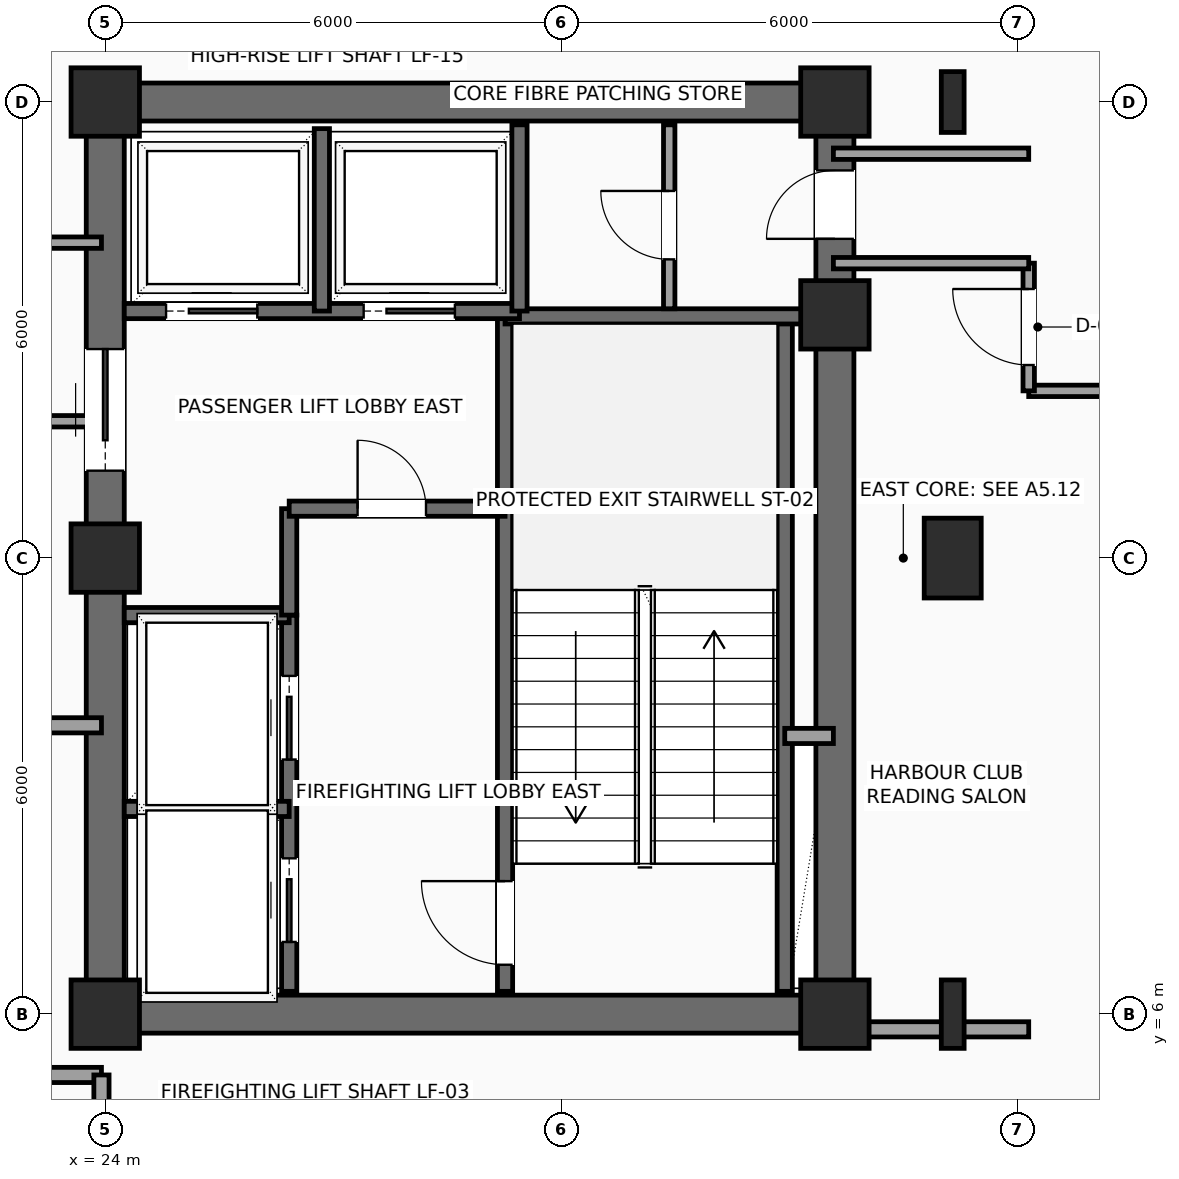
"""IFC4 building model, lengths in metres.
Left out: names, types, materials, properties, quantities, classifications, styles, units other than length and angle.
Written with IfcOpenShell. Run it as: python <this file> out.ifc"""

import sys

from ifc_helpers import new_model, si_unit, direction, frame, frame_2d, origin, origin_2d, place, context, subcontext, project, spatial, rectangle, i_section, extrude, element, fill, save


model = new_model("IFC4")
c1 = context("Model", 3, precision=1e-05, world=origin(), true_north=direction((0.0, 1.0)))
c2 = subcontext(c1, "Body", "Model", "MODEL_VIEW")
j1 = project(units=[si_unit("LENGTHUNIT", "METRE"), si_unit("PLANEANGLEUNIT", "RADIAN")], contexts=[c1])
p1 = place(None, origin())
s1 = spatial("IfcSite", under=j1, at=p1, CompositionType="ELEMENT")
p2 = place(p1, origin())
s2 = spatial("IfcBuilding", under=s1, at=p2, CompositionType="ELEMENT")
p3 = place(p2, frame((0.0, 0.0, 231.15)))
s3 = spatial("IfcBuildingStorey", under=s2, at=p3, CompositionType="ELEMENT", Elevation=231.15)
for number, where, z_axis, x_axis in (
    (1, (24.0, 6.0, 0.0), (0.0, 0.0, 1.0), (1.0, 0.0, 0.0)),
    (2, (24.0, 12.0, 0.0), (0.0, 0.0, 1.0), (1.0, 0.0, 0.0)),
    (3, (24.0, 18.0, 0.0), (0.0, 0.0, 1.0), (1.0, 0.0, 0.0)),
    (4, (33.6, 6.0, 0.0), (0.0, 0.0, 1.0), (1.0, 0.0, 0.0)),
    (5, (33.6, 15.2, 0.0), (0.0, 0.0, 1.0), (1.0, 0.0, 0.0)),
    (6, (33.6, 18.0, 0.0), (0.0, 0.0, 1.0), (1.0, 0.0, 0.0)),
):
    element("IfcColumn", number, at=place(p3, frame(where, z_axis=z_axis, x_axis=x_axis)), inside=s3, PredefinedType="COLUMN", context=c2, shape_type="SweptSolid", body=[
        extrude(rectangle(XDim=0.9, YDim=0.9, at=origin_2d()), origin(), (0.0, 0.0, 1.0), 3.75),
    ])
p4 = place(p3, frame((35.15, 6.0, 0.0), z_axis=(0.0, 0.0, 1.0), x_axis=(1.0, 0.0, 0.0)))
e7 = element("IfcColumn", 7, at=p4, inside=s3, PredefinedType="COLUMN", context=c2, shape_type="SweptSolid", body=[
    extrude(i_section(OverallWidth=0.3, OverallDepth=0.9, WebThickness=0.019, FlangeThickness=0.035, FilletRadius=0.03, at=origin_2d()), origin(), (0.0, 0.0, 1.0), 3.75),
])
p5 = place(p3, frame((35.15, 12.0, 0.0), z_axis=(0.0, 0.0, 1.0), x_axis=(1.0, 0.0, 0.0)))
e8 = element("IfcColumn", 8, at=p5, inside=s3, PredefinedType="COLUMN", context=c2, shape_type="SweptSolid", body=[
    extrude(rectangle(XDim=0.75, YDim=1.05, at=origin_2d()), origin(), (0.0, 0.0, 1.0), 3.75),
])
p6 = place(p3, frame((35.15, 18.0, 0.0), z_axis=(0.0, 0.0, 1.0), x_axis=(1.0, 0.0, 0.0)))
e9 = element("IfcColumn", 9, at=p6, inside=s3, PredefinedType="COLUMN", context=c2, shape_type="SweptSolid", body=[
    extrude(i_section(OverallWidth=0.3, OverallDepth=0.8, WebThickness=0.018, FlangeThickness=0.033, FilletRadius=0.03, at=origin_2d()), origin(), (0.0, 0.0, 1.0), 3.75),
])
for number, where, z_axis, x_axis in (
    (10, (24.0, 6.0, 0.0), (0.0, 0.0, 1.0), (1.0, 0.0, 0.0)),
    (11, (24.0, 18.0, 0.0), (0.0, 0.0, 1.0), (1.0, 0.0, 0.0)),
):
    element("IfcWall", number, at=place(p3, frame(where, z_axis=z_axis, x_axis=x_axis)), inside=s3, PredefinedType="SHEAR", context=c2, shape_type="SweptSolid", body=[
        extrude(rectangle(XDim=9.6, YDim=0.5, at=frame_2d((4.8, 0.0))), origin(), (0.0, 0.0, 1.0), 3.425),
    ])
p7 = place(p3, frame((24.0, 6.0, 0.0), z_axis=(0.0, 0.0, 1.0), x_axis=(0.0, 1.0, 0.0)))
e12 = element("IfcWall", 12, at=p7, inside=s3, PredefinedType="SHEAR", context=c2, shape_type="SweptSolid", body=[
    extrude(rectangle(XDim=12.0, YDim=0.5, at=frame_2d((6.0, 0.0))), origin(), (0.0, 0.0, 1.0), 3.425),
])
p8 = place(p7, frame((7.15, 0.0, 0.0)))
e13 = element("IfcOpeningElement", 13, at=p8, cuts=e12, PredefinedType="OPENING", context=c2, shape_type="SweptSolid", body=[
    extrude(rectangle(XDim=1.6, YDim=2.3, at=frame_2d((0.8, 1.15))), frame((0.0, 0.26, 0.0), z_axis=(0.0, -1.0, 0.0), x_axis=(1.0, 0.0, 0.0)), (0.0, 0.0, 1.0), 0.52),
])
p9 = place(p3, frame((33.6, 6.0, 0.0), z_axis=(0.0, 0.0, 1.0), x_axis=(0.0, 1.0, 0.0)))
e14 = element("IfcWall", 14, at=p9, inside=s3, PredefinedType="SHEAR", context=c2, shape_type="SweptSolid", body=[
    extrude(rectangle(XDim=12.0, YDim=0.5, at=frame_2d((6.0, 0.0))), origin(), (0.0, 0.0, 1.0), 3.425),
])
p10 = place(p9, frame((10.2, 0.0, 0.0)))
e15 = element("IfcOpeningElement", 15, at=p10, cuts=e14, PredefinedType="OPENING", context=c2, shape_type="SweptSolid", body=[
    extrude(rectangle(XDim=0.9, YDim=2.15, at=frame_2d((0.45, 1.075))), frame((0.0, 0.26, 0.0), z_axis=(0.0, -1.0, 0.0), x_axis=(1.0, 0.0, 0.0)), (0.0, 0.0, 1.0), 0.52),
])
p11 = place(p3, frame((29.26, 6.3, 0.0), z_axis=(0.0, 0.0, 1.0), x_axis=(0.0, 1.0, 0.0)))
e16 = element("IfcWall", 16, at=p11, inside=s3, PredefinedType="SHEAR", context=c2, shape_type="SweptSolid", body=[
    extrude(rectangle(XDim=8.88, YDim=0.2, at=frame_2d((4.44, 0.0))), origin(), (0.0, 0.0, 1.0), 3.425),
])
p12 = place(p11, frame((0.35, 0.0, 0.0)))
e17 = element("IfcOpeningElement", 17, at=p12, cuts=e16, PredefinedType="OPENING", context=c2, shape_type="SweptSolid", body=[
    extrude(rectangle(XDim=1.1, YDim=2.2, at=frame_2d((0.55, 1.1))), frame((0.0, 0.11, 0.0), z_axis=(0.0, -1.0, 0.0), x_axis=(1.0, 0.0, 0.0)), (0.0, 0.0, 1.0), 0.22),
])
p13 = place(p3, frame((32.94, 6.3, 0.0), z_axis=(0.0, 0.0, 1.0), x_axis=(0.0, 1.0, 0.0)))
e18 = element("IfcWall", 18, at=p13, inside=s3, PredefinedType="SHEAR", context=c2, shape_type="SweptSolid", body=[
    extrude(rectangle(XDim=8.88, YDim=0.2, at=frame_2d((4.44, 0.0))), origin(), (0.0, 0.0, 1.0), 3.425),
])
p14 = place(p3, frame((29.26, 15.18, 0.0), z_axis=(0.0, 0.0, 1.0), x_axis=(1.0, 0.0, 0.0)))
e19 = element("IfcWall", 19, at=p14, inside=s3, PredefinedType="SHEAR", context=c2, shape_type="SweptSolid", body=[
    extrude(rectangle(XDim=4.04, YDim=0.2, at=frame_2d((2.02, 0.0))), origin(), (0.0, 0.0, 1.0), 3.425),
])
p15 = place(p3, frame((26.42, 6.3, 0.0), z_axis=(0.0, 0.0, 1.0), x_axis=(0.0, 1.0, 0.0)))
e20 = element("IfcWall", 20, at=p15, inside=s3, PredefinedType="SHEAR", context=c2, shape_type="SweptSolid", body=[
    extrude(rectangle(XDim=4.95, YDim=0.2, at=frame_2d((2.475, 0.0))), origin(), (0.0, 0.0, 1.0), 3.425),
])
p16 = place(p15, frame((0.65, 0.0, 0.0)))
e21 = element("IfcOpeningElement", 21, at=p16, cuts=e20, PredefinedType="OPENING", context=c2, shape_type="SweptSolid", body=[
    extrude(rectangle(XDim=1.1, YDim=2.2, at=frame_2d((0.55, 1.1))), frame((0.0, 0.11, 0.0), z_axis=(0.0, -1.0, 0.0), x_axis=(1.0, 0.0, 0.0)), (0.0, 0.0, 1.0), 0.22),
])
p17 = place(p15, frame((3.05, 0.0, 0.0)))
e22 = element("IfcOpeningElement", 22, at=p17, cuts=e20, PredefinedType="OPENING", context=c2, shape_type="SweptSolid", body=[
    extrude(rectangle(XDim=1.1, YDim=2.2, at=frame_2d((0.55, 1.1))), frame((0.0, 0.11, 0.0), z_axis=(0.0, -1.0, 0.0), x_axis=(1.0, 0.0, 0.0)), (0.0, 0.0, 1.0), 0.22),
])
for number, where, z_axis, x_axis in (
    (23, (24.25, 8.7, 0.0), (0.0, 0.0, 1.0), (1.0, 0.0, 0.0)),
    (24, (24.25, 11.25, 0.0), (0.0, 0.0, 1.0), (1.0, 0.0, 0.0)),
):
    element("IfcWall", number, at=place(p3, frame(where, z_axis=z_axis, x_axis=x_axis)), inside=s3, PredefinedType="SHEAR", context=c2, shape_type="SweptSolid", body=[
        extrude(rectangle(XDim=2.17, YDim=0.2, at=frame_2d((1.085, 0.0))), origin(), (0.0, 0.0, 1.0), 3.425),
    ])
p18 = place(p3, frame((26.42, 11.25, 0.0), z_axis=(0.0, 0.0, 1.0), x_axis=(0.0, 1.0, 0.0)))
e25 = element("IfcWall", 25, at=p18, inside=s3, PredefinedType="SHEAR", context=c2, shape_type="SweptSolid", body=[
    extrude(rectangle(XDim=1.4, YDim=0.2, at=frame_2d((0.7, 0.0))), origin(), (0.0, 0.0, 1.0), 3.425),
])
p19 = place(p3, frame((26.42, 12.65, 0.0), z_axis=(0.0, 0.0, 1.0), x_axis=(1.0, 0.0, 0.0)))
e26 = element("IfcWall", 26, at=p19, inside=s3, PredefinedType="SHEAR", context=c2, shape_type="SweptSolid", body=[
    extrude(rectangle(XDim=2.84, YDim=0.2, at=frame_2d((1.42, 0.0))), origin(), (0.0, 0.0, 1.0), 3.425),
])
p20 = place(p19, frame((0.9, 0.0, 0.0)))
e27 = element("IfcOpeningElement", 27, at=p20, cuts=e26, PredefinedType="OPENING", context=c2, shape_type="SweptSolid", body=[
    extrude(rectangle(XDim=0.9, YDim=2.15, at=frame_2d((0.45, 1.075))), frame((0.0, 0.11, 0.0), z_axis=(0.0, -1.0, 0.0), x_axis=(1.0, 0.0, 0.0)), (0.0, 0.0, 1.0), 0.22),
])
p21 = place(p3, frame((32.94, 9.66, 0.0), z_axis=(0.0, 0.0, 1.0), x_axis=(1.0, 0.0, 0.0)))
e28 = element("IfcWall", 28, at=p21, inside=s3, PredefinedType="SOLIDWALL", context=c2, shape_type="SweptSolid", body=[
    extrude(rectangle(XDim=0.64, YDim=0.2, at=frame_2d((0.32, 0.0))), origin(), (0.0, 0.0, 1.0), 3.425),
])
p22 = place(p3, frame((24.25, 15.25, 0.0), z_axis=(0.0, 0.0, 1.0), x_axis=(1.0, 0.0, 0.0)))
e29 = element("IfcWall", 29, at=p22, inside=s3, PredefinedType="SHEAR", context=c2, shape_type="SweptSolid", body=[
    extrude(rectangle(XDim=5.2, YDim=0.2, at=frame_2d((2.6, 0.0))), origin(), (0.0, 0.0, 1.0), 3.425),
])
p23 = place(p22, frame((0.55, 0.0, 0.0)))
e30 = element("IfcOpeningElement", 30, at=p23, cuts=e29, PredefinedType="OPENING", context=c2, shape_type="SweptSolid", body=[
    extrude(rectangle(XDim=1.2, YDim=2.2, at=frame_2d((0.6, 1.1))), frame((0.0, 0.11, 0.0), z_axis=(0.0, -1.0, 0.0), x_axis=(1.0, 0.0, 0.0)), (0.0, 0.0, 1.0), 0.22),
])
p24 = place(p22, frame((3.15, 0.0, 0.0)))
e31 = element("IfcOpeningElement", 31, at=p24, cuts=e29, PredefinedType="OPENING", context=c2, shape_type="SweptSolid", body=[
    extrude(rectangle(XDim=1.2, YDim=2.2, at=frame_2d((0.6, 1.1))), frame((0.0, 0.11, 0.0), z_axis=(0.0, -1.0, 0.0), x_axis=(1.0, 0.0, 0.0)), (0.0, 0.0, 1.0), 0.22),
])
p25 = place(p3, frame((26.85, 15.25, 0.0), z_axis=(0.0, 0.0, 1.0), x_axis=(0.0, 1.0, 0.0)))
e32 = element("IfcWall", 32, at=p25, inside=s3, PredefinedType="SHEAR", context=c2, shape_type="SweptSolid", body=[
    extrude(rectangle(XDim=2.4, YDim=0.2, at=frame_2d((1.2, 0.0))), origin(), (0.0, 0.0, 1.0), 3.425),
])
p26 = place(p3, frame((29.45, 15.25, 0.0), z_axis=(0.0, 0.0, 1.0), x_axis=(0.0, 1.0, 0.0)))
e33 = element("IfcWall", 33, at=p26, inside=s3, PredefinedType="SHEAR", context=c2, shape_type="SweptSolid", body=[
    extrude(rectangle(XDim=2.45, YDim=0.2, at=frame_2d((1.225, 0.0))), origin(), (0.0, 0.0, 1.0), 3.425),
])
p27 = place(p3, frame((31.42, 15.28, 0.0), z_axis=(0.0, 0.0, 1.0), x_axis=(0.0, 1.0, 0.0)))
e34 = element("IfcWall", 34, at=p27, inside=s3, PredefinedType="PARTITIONING", context=c2, shape_type="SweptSolid", body=[
    extrude(rectangle(XDim=2.42, YDim=0.15, at=frame_2d((1.21, 0.0))), origin(), (0.0, 0.0, 1.0), 3.425),
])
p28 = place(p27, frame((0.65, 0.0, 0.0)))
e35 = element("IfcOpeningElement", 35, at=p28, cuts=e34, PredefinedType="OPENING", context=c2, shape_type="SweptSolid", body=[
    extrude(rectangle(XDim=0.9, YDim=2.15, at=frame_2d((0.45, 1.075))), frame((0.0, 0.085, 0.0), z_axis=(0.0, -1.0, 0.0), x_axis=(1.0, 0.0, 0.0)), (0.0, 0.0, 1.0), 0.17),
])
p29 = place(p3, frame((38.55, 14.2, 0.0), z_axis=(0.0, 0.0, 1.0), x_axis=(-1.0, 0.0, 0.0)))
e36 = element("IfcWall", 36, at=p29, inside=s3, PredefinedType="PARTITIONING", context=c2, shape_type="SweptSolid", body=[
    extrude(rectangle(XDim=2.4, YDim=0.15, at=frame_2d((1.2, 0.0))), origin(), (0.0, 0.0, 1.0), 3.425),
])
p30 = place(p3, frame((36.15, 14.2, 0.0), z_axis=(0.0, 0.0, 1.0), x_axis=(0.0, 1.0, 0.0)))
e37 = element("IfcWall", 37, at=p30, inside=s3, PredefinedType="PARTITIONING", context=c2, shape_type="SweptSolid", body=[
    extrude(rectangle(XDim=1.68, YDim=0.15, at=frame_2d((0.84, 0.0))), origin(), (0.0, 0.0, 1.0), 3.425),
])
p31 = place(p30, frame((0.34, 0.0, 0.0)))
e38 = element("IfcOpeningElement", 38, at=p31, cuts=e37, PredefinedType="OPENING", context=c2, shape_type="SweptSolid", body=[
    extrude(rectangle(XDim=1.0, YDim=2.2, at=frame_2d((0.5, 1.1))), frame((0.0, 0.085, 0.0), z_axis=(0.0, -1.0, 0.0), x_axis=(1.0, 0.0, 0.0)), (0.0, 0.0, 1.0), 0.17),
])
for number, where, z_axis, x_axis in (
    (39, (36.15, 15.88, 0.0), (0.0, 0.0, 1.0), (-1.0, 0.0, 0.0)),
    (40, (33.58, 17.32, 0.0), (0.0, 0.0, 1.0), (1.0, 0.0, 0.0)),
):
    element("IfcWall", number, at=place(p3, frame(where, z_axis=z_axis, x_axis=x_axis)), inside=s3, PredefinedType="PARTITIONING", context=c2, shape_type="SweptSolid", body=[
        extrude(rectangle(XDim=2.57, YDim=0.15, at=frame_2d((1.285, 0.0))), origin(), (0.0, 0.0, 1.0), 3.425),
    ])
p32 = place(p3, frame((20.45, 16.15, 0.0), z_axis=(0.0, 0.0, 1.0), x_axis=(1.0, 0.0, 0.0)))
e41 = element("IfcWall", 41, at=p32, inside=s3, PredefinedType="PARTITIONING", context=c2, shape_type="SweptSolid", body=[
    extrude(rectangle(XDim=3.5, YDim=0.15, at=frame_2d((1.75, 0.0))), origin(), (0.0, 0.0, 1.0), 3.425),
])
p33 = place(p3, frame((23.95, 13.8, 0.0), z_axis=(0.0, 0.0, 1.0), x_axis=(-1.0, 0.0, 0.0)))
e42 = element("IfcWall", 42, at=p33, inside=s3, PredefinedType="PARTITIONING", context=c2, shape_type="SweptSolid", body=[
    extrude(rectangle(XDim=9.0, YDim=0.15, at=frame_2d((4.5, 0.0))), origin(), (0.0, 0.0, 1.0), 3.425),
])
p34 = place(p3, frame((33.65, 5.8, 0.0), z_axis=(0.0, 0.0, 1.0), x_axis=(1.0, 0.0, 0.0)))
e43 = element("IfcWall", 43, at=p34, inside=s3, PredefinedType="PARTITIONING", context=c2, shape_type="SweptSolid", body=[
    extrude(rectangle(XDim=2.5, YDim=0.2, at=frame_2d((1.25, 0.0))), origin(), (0.0, 0.0, 1.0), 3.017),
])
p35 = place(p3, frame((14.95, 5.2, 0.0), z_axis=(0.0, 0.0, 1.0), x_axis=(1.0, 0.0, 0.0)))
e44 = element("IfcWall", 44, at=p35, inside=s3, PredefinedType="PARTITIONING", context=c2, shape_type="SweptSolid", body=[
    extrude(rectangle(XDim=9.0, YDim=0.2, at=frame_2d((4.5, 0.0))), origin(), (0.0, 0.0, 1.0), 3.425),
])
p36 = place(p3, frame((23.95, 0.3, 0.0), z_axis=(0.0, 0.0, 1.0), x_axis=(0.0, 1.0, 0.0)))
e45 = element("IfcWall", 45, at=p36, inside=s3, PredefinedType="PARTITIONING", context=c2, shape_type="SweptSolid", body=[
    extrude(rectangle(XDim=4.9, YDim=0.2, at=frame_2d((2.45, 0.0))), origin(), (0.0, 0.0, 1.0), 3.017),
])
p37 = place(p3, frame((14.95, 9.8, 0.0), z_axis=(0.0, 0.0, 1.0), x_axis=(1.0, 0.0, 0.0)))
e46 = element("IfcWall", 46, at=p37, inside=s3, PredefinedType="PARTITIONING", context=c2, shape_type="SweptSolid", body=[
    extrude(rectangle(XDim=9.0, YDim=0.2, at=frame_2d((4.5, 0.0))), origin(), (0.0, 0.0, 1.0), 3.425),
])
p38 = place(p8, origin())
e47 = element("IfcDoor", 47, at=p38, inside=s3, OperationType="DOUBLE_DOOR_SLIDING", PredefinedType="DOOR", context=c2, shape_type="SweptSolid", body=[
    extrude(rectangle(XDim=1.6, YDim=2.3, at=frame_2d((0.8, 1.15))), frame((0.0, 0.025, 0.0), z_axis=(0.0, -1.0, 0.0), x_axis=(1.0, 0.0, 0.0)), (0.0, 0.0, 1.0), 0.05),
])
fill(e13, e47)
p39 = place(p10, origin())
e48 = element("IfcDoor", 48, at=p39, inside=s3, OperationType="SINGLE_SWING_LEFT", PredefinedType="DOOR", context=c2, shape_type="SweptSolid", body=[
    extrude(rectangle(XDim=0.9, YDim=2.15, at=frame_2d((0.45, 1.075))), frame((0.0, 0.025, 0.0), z_axis=(0.0, -1.0, 0.0), x_axis=(1.0, 0.0, 0.0)), (0.0, 0.0, 1.0), 0.05),
])
fill(e15, e48)
p40 = place(p12, origin())
e49 = element("IfcDoor", 49, at=p40, inside=s3, OperationType="SINGLE_SWING_RIGHT", PredefinedType="DOOR", context=c2, shape_type="SweptSolid", body=[
    extrude(rectangle(XDim=1.1, YDim=2.2, at=frame_2d((0.55, 1.1))), frame((0.0, 0.025, 0.0), z_axis=(0.0, -1.0, 0.0), x_axis=(1.0, 0.0, 0.0)), (0.0, 0.0, 1.0), 0.05),
])
fill(e17, e49)
p41 = place(p16, origin())
e50 = element("IfcDoor", 50, at=p41, inside=s3, OperationType="SLIDING_TO_LEFT", PredefinedType="DOOR", context=c2, shape_type="SweptSolid", body=[
    extrude(rectangle(XDim=1.1, YDim=2.2, at=frame_2d((0.55, 1.1))), frame((0.0, 0.025, 0.0), z_axis=(0.0, -1.0, 0.0), x_axis=(1.0, 0.0, 0.0)), (0.0, 0.0, 1.0), 0.05),
])
fill(e21, e50)
p42 = place(p17, origin())
e51 = element("IfcDoor", 51, at=p42, inside=s3, OperationType="SLIDING_TO_LEFT", PredefinedType="DOOR", context=c2, shape_type="SweptSolid", body=[
    extrude(rectangle(XDim=1.1, YDim=2.2, at=frame_2d((0.55, 1.1))), frame((0.0, 0.025, 0.0), z_axis=(0.0, -1.0, 0.0), x_axis=(1.0, 0.0, 0.0)), (0.0, 0.0, 1.0), 0.05),
])
fill(e22, e51)
p43 = place(p20, origin())
e52 = element("IfcDoor", 52, at=p43, inside=s3, OperationType="SINGLE_SWING_LEFT", PredefinedType="DOOR", context=c2, shape_type="SweptSolid", body=[
    extrude(rectangle(XDim=0.9, YDim=2.15, at=frame_2d((0.45, 1.075))), frame((0.0, 0.025, 0.0), z_axis=(0.0, -1.0, 0.0), x_axis=(1.0, 0.0, 0.0)), (0.0, 0.0, 1.0), 0.05),
])
fill(e27, e52)
p44 = place(p23, origin())
e53 = element("IfcDoor", 53, at=p44, inside=s3, OperationType="SLIDING_TO_RIGHT", PredefinedType="DOOR", context=c2, shape_type="SweptSolid", body=[
    extrude(rectangle(XDim=1.2, YDim=2.2, at=frame_2d((0.6, 1.1))), frame((0.0, 0.025, 0.0), z_axis=(0.0, -1.0, 0.0), x_axis=(1.0, 0.0, 0.0)), (0.0, 0.0, 1.0), 0.05),
])
fill(e30, e53)
p45 = place(p24, origin())
e54 = element("IfcDoor", 54, at=p45, inside=s3, OperationType="SLIDING_TO_RIGHT", PredefinedType="DOOR", context=c2, shape_type="SweptSolid", body=[
    extrude(rectangle(XDim=1.2, YDim=2.2, at=frame_2d((0.6, 1.1))), frame((0.0, 0.025, 0.0), z_axis=(0.0, -1.0, 0.0), x_axis=(1.0, 0.0, 0.0)), (0.0, 0.0, 1.0), 0.05),
])
fill(e31, e54)
p46 = place(p28, origin())
e55 = element("IfcDoor", 55, at=p46, inside=s3, OperationType="SINGLE_SWING_RIGHT", PredefinedType="DOOR", context=c2, shape_type="SweptSolid", body=[
    extrude(rectangle(XDim=0.9, YDim=2.15, at=frame_2d((0.45, 1.075))), frame((0.0, 0.025, 0.0), z_axis=(0.0, -1.0, 0.0), x_axis=(1.0, 0.0, 0.0)), (0.0, 0.0, 1.0), 0.05),
])
fill(e35, e55)
p47 = place(p31, origin())
e56 = element("IfcDoor", 56, at=p47, inside=s3, OperationType="SINGLE_SWING_RIGHT", PredefinedType="DOOR", context=c2, shape_type="SweptSolid", body=[
    extrude(rectangle(XDim=1.0, YDim=2.2, at=frame_2d((0.5, 1.1))), frame((0.0, 0.025, 0.0), z_axis=(0.0, -1.0, 0.0), x_axis=(1.0, 0.0, 0.0)), (0.0, 0.0, 1.0), 0.05),
])
fill(e38, e56)
save(model, sys.argv[1])
